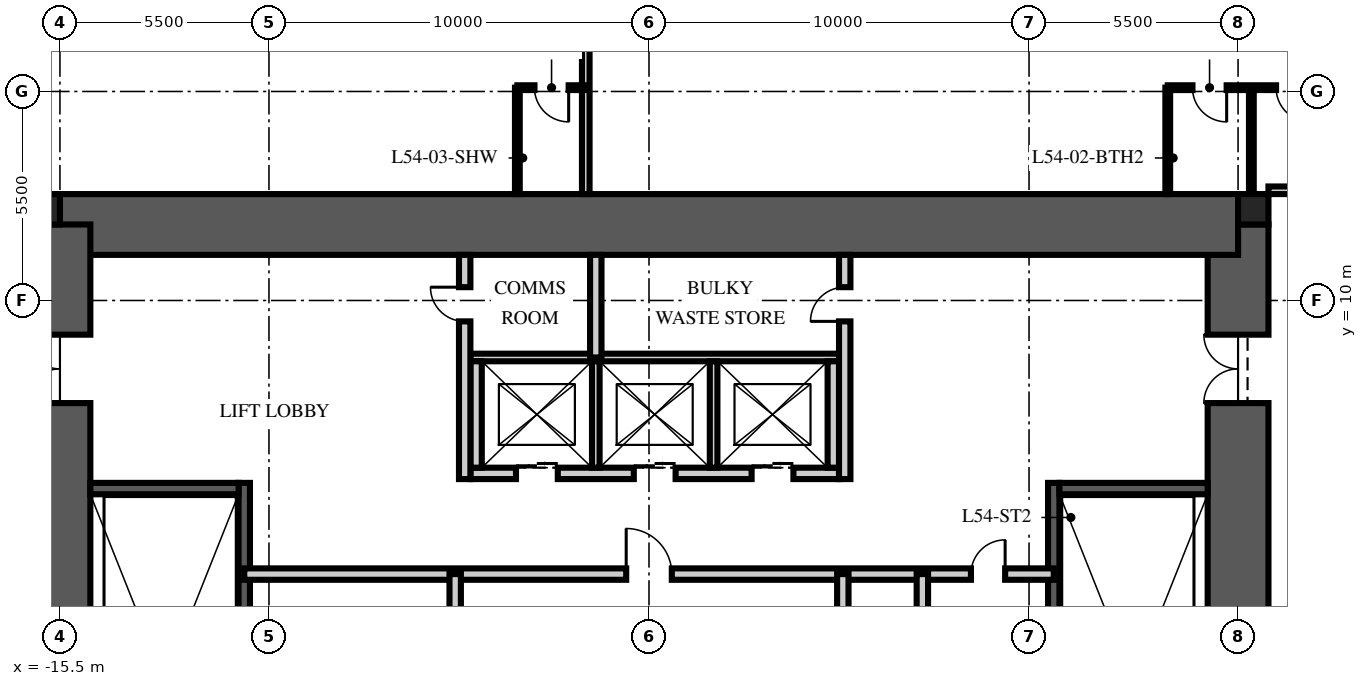
"""IFC4 building model, lengths in metres.
Left out: names, types, materials, properties, quantities, classifications, styles, units other than length and angle.
Written with IfcOpenShell. Run it as: python <this file> out.ifc"""

import sys

from ifc_helpers import new_model, si_unit, direction, frame, frame_2d, origin, origin_2d, place, context, subcontext, project, spatial, rectangle, extrude, element, fill, save


model = new_model("IFC4")
c1 = context("Model", 3, precision=1e-05, world=origin(), true_north=direction((0.0, 1.0)))
c2 = subcontext(c1, "Body", "Model", "MODEL_VIEW")
j1 = project(units=[si_unit("LENGTHUNIT", "METRE"), si_unit("PLANEANGLEUNIT", "RADIAN")], contexts=[c1])
p1 = place(None, origin())
s1 = spatial("IfcSite", under=j1, at=p1, CompositionType="ELEMENT")
p2 = place(p1, origin())
s2 = spatial("IfcBuilding", under=s1, at=p2, CompositionType="ELEMENT")
p3 = place(p2, frame((0.0, 0.0, 218.25)))
s3 = spatial("IfcBuildingStorey", under=s2, at=p3, CompositionType="ELEMENT", Elevation=218.25)
p4 = place(p3, frame((15.5, -12.0, -0.25), z_axis=(0.0, 0.0, 1.0), x_axis=(0.0, 1.0, 0.0)))
e1 = element("IfcWall", 1, at=p4, inside=s3, PredefinedType="SHEAR", context=c2, shape_type="SweptSolid", body=[
    extrude(rectangle(XDim=24.0, YDim=1.6, at=frame_2d((12.0, 0.0))), origin(), (0.0, 0.0, 1.0), 3.75),
])
p5 = place(p4, frame((3.2, 0.0, 0.25)))
e2 = element("IfcOpeningElement", 2, at=p5, cuts=e1, PredefinedType="OPENING", context=c2, shape_type="SweptSolid", body=[
    extrude(rectangle(XDim=1.2, YDim=2.1, at=frame_2d((0.6, 1.05))), frame((0.0, 0.81, 0.0), z_axis=(0.0, -1.0, 0.0), x_axis=(1.0, 0.0, 0.0)), (0.0, 0.0, 1.0), 1.62),
])
p6 = place(p4, frame((19.3, 0.0, 0.25)))
e3 = element("IfcOpeningElement", 3, at=p6, cuts=e1, PredefinedType="OPENING", context=c2, shape_type="SweptSolid", body=[
    extrude(rectangle(XDim=1.8, YDim=2.1, at=frame_2d((0.9, 1.05))), frame((0.0, 0.81, 0.0), z_axis=(0.0, -1.0, 0.0), x_axis=(1.0, 0.0, 0.0)), (0.0, 0.0, 1.0), 1.62),
])
p7 = place(p3, frame((-15.5, 12.0, -0.25), z_axis=(0.0, 0.0, 1.0), x_axis=(1.0, 0.0, 0.0)))
e4 = element("IfcWall", 4, at=p7, inside=s3, PredefinedType="SHEAR", context=c2, shape_type="SweptSolid", body=[
    extrude(rectangle(XDim=31.0, YDim=1.6, at=frame_2d((15.5, 0.0))), origin(), (0.0, 0.0, 1.0), 3.75),
])
p8 = place(p3, frame((-15.5, -12.0, -0.25), z_axis=(0.0, 0.0, 1.0), x_axis=(0.0, 1.0, 0.0)))
e5 = element("IfcWall", 5, at=p8, inside=s3, PredefinedType="SHEAR", context=c2, shape_type="SweptSolid", body=[
    extrude(rectangle(XDim=24.0, YDim=1.6, at=frame_2d((12.0, 0.0))), origin(), (0.0, 0.0, 1.0), 3.75),
])
p9 = place(p8, frame((3.2, 0.0, 0.25)))
e6 = element("IfcOpeningElement", 6, at=p9, cuts=e5, PredefinedType="OPENING", context=c2, shape_type="SweptSolid", body=[
    extrude(rectangle(XDim=1.2, YDim=2.1, at=frame_2d((0.6, 1.05))), frame((0.0, 0.81, 0.0), z_axis=(0.0, -1.0, 0.0), x_axis=(1.0, 0.0, 0.0)), (0.0, 0.0, 1.0), 1.62),
])
p10 = place(p8, frame((19.3, 0.0, 0.25)))
e7 = element("IfcOpeningElement", 7, at=p10, cuts=e5, PredefinedType="OPENING", context=c2, shape_type="SweptSolid", body=[
    extrude(rectangle(XDim=1.8, YDim=2.1, at=frame_2d((0.9, 1.05))), frame((0.0, 0.81, 0.0), z_axis=(0.0, -1.0, 0.0), x_axis=(1.0, 0.0, 0.0)), (0.0, 0.0, 1.0), 1.62),
])
for number, where, z_axis, x_axis in (
    (8, (15.9, 12.4, -0.25), (0.0, 0.0, 1.0), (1.0, 0.0, 0.0)),
    (9, (-15.9, 12.4, -0.25), (0.0, 0.0, 1.0), (1.0, 0.0, 0.0)),
):
    element("IfcColumn", number, at=place(p3, frame(where, z_axis=z_axis, x_axis=x_axis)), inside=s3, PredefinedType="COLUMN", context=c2, shape_type="SweptSolid", body=[
        extrude(rectangle(XDim=0.8, YDim=0.8, at=origin_2d()), origin(), (0.0, 0.0, 1.0), 3.75),
    ])
p11 = place(p3, frame((-10.65, -4.9, 0.0), z_axis=(0.0, 0.0, 1.0), x_axis=(0.0, 1.0, 0.0)))
e10 = element("IfcWall", 10, at=p11, inside=s3, PredefinedType="SOLIDWALL", context=c2, shape_type="SweptSolid", body=[
    extrude(rectangle(XDim=10.1, YDim=0.3, at=frame_2d((5.05, 0.0))), origin(), (0.0, 0.0, 1.0), 3.5),
])
p12 = place(p3, frame((-14.7, 5.05, 0.0), z_axis=(0.0, 0.0, 1.0), x_axis=(1.0, 0.0, 0.0)))
e11 = element("IfcWall", 11, at=p12, inside=s3, PredefinedType="SOLIDWALL", context=c2, shape_type="SweptSolid", body=[
    extrude(rectangle(XDim=3.9, YDim=0.3, at=frame_2d((1.95, 0.0))), origin(), (0.0, 0.0, 1.0), 3.5),
])
p13 = place(p3, frame((10.65, -4.9, 0.0), z_axis=(0.0, 0.0, 1.0), x_axis=(0.0, 1.0, 0.0)))
e12 = element("IfcWall", 12, at=p13, inside=s3, PredefinedType="SOLIDWALL", context=c2, shape_type="SweptSolid", body=[
    extrude(rectangle(XDim=10.1, YDim=0.3, at=frame_2d((5.05, 0.0))), origin(), (0.0, 0.0, 1.0), 3.5),
])
p14 = place(p3, frame((14.7, 5.05, 0.0), z_axis=(0.0, 0.0, 1.0), x_axis=(-1.0, 0.0, 0.0)))
e13 = element("IfcWall", 13, at=p14, inside=s3, PredefinedType="SOLIDWALL", context=c2, shape_type="SweptSolid", body=[
    extrude(rectangle(XDim=3.9, YDim=0.3, at=frame_2d((1.95, 0.0))), origin(), (0.0, 0.0, 1.0), 3.5),
])
p15 = place(p3, frame((-4.7, 5.45, 0.0), z_axis=(0.0, 0.0, 1.0), x_axis=(1.0, 0.0, 0.0)))
e14 = element("IfcWall", 14, at=p15, inside=s3, PredefinedType="PARTITIONING", context=c2, shape_type="SweptSolid", body=[
    extrude(rectangle(XDim=9.7, YDim=0.3, at=frame_2d((4.85, 0.0))), origin(), (0.0, 0.0, 1.0), 3.5),
])
p16 = place(p15, frame((1.2, 0.0, 0.0)))
e15 = element("IfcOpeningElement", 15, at=p16, cuts=e14, PredefinedType="OPENING", context=c2, shape_type="SweptSolid", body=[
    extrude(rectangle(XDim=1.1, YDim=2.1, at=frame_2d((0.55, 1.05))), frame((0.0, 0.16, 0.0), z_axis=(0.0, -1.0, 0.0), x_axis=(1.0, 0.0, 0.0)), (0.0, 0.0, 1.0), 0.32),
])
p17 = place(p15, frame((4.3, 0.0, 0.0)))
e16 = element("IfcOpeningElement", 16, at=p17, cuts=e14, PredefinedType="OPENING", context=c2, shape_type="SweptSolid", body=[
    extrude(rectangle(XDim=1.1, YDim=2.1, at=frame_2d((0.55, 1.05))), frame((0.0, 0.16, 0.0), z_axis=(0.0, -1.0, 0.0), x_axis=(1.0, 0.0, 0.0)), (0.0, 0.0, 1.0), 0.32),
])
p18 = place(p15, frame((7.4, 0.0, 0.0)))
e17 = element("IfcOpeningElement", 17, at=p18, cuts=e14, PredefinedType="OPENING", context=c2, shape_type="SweptSolid", body=[
    extrude(rectangle(XDim=1.1, YDim=2.1, at=frame_2d((0.55, 1.05))), frame((0.0, 0.16, 0.0), z_axis=(0.0, -1.0, 0.0), x_axis=(1.0, 0.0, 0.0)), (0.0, 0.0, 1.0), 0.32),
])
p19 = place(p3, frame((-4.7, 8.5, 0.0), z_axis=(0.0, 0.0, 1.0), x_axis=(1.0, 0.0, 0.0)))
e18 = element("IfcWall", 18, at=p19, inside=s3, PredefinedType="PARTITIONING", context=c2, shape_type="SweptSolid", body=[
    extrude(rectangle(XDim=9.7, YDim=0.2, at=frame_2d((4.85, 0.0))), origin(), (0.0, 0.0, 1.0), 3.5),
])
for number, where, z_axis, x_axis in (
    (19, (-4.55, 5.6, 0.0), (0.0, 0.0, 1.0), (0.0, 1.0, 0.0)),
    (20, (4.85, 5.6, 0.0), (0.0, 0.0, 1.0), (0.0, 1.0, 0.0)),
):
    element("IfcWall", number, at=place(p3, frame(where, z_axis=z_axis, x_axis=x_axis)), inside=s3, PredefinedType="PARTITIONING", context=c2, shape_type="SweptSolid", body=[
        extrude(rectangle(XDim=2.8, YDim=0.3, at=frame_2d((1.4, 0.0))), origin(), (0.0, 0.0, 1.0), 3.5),
    ])
for number, where, z_axis, x_axis in (
    (21, (-1.4, 5.6, 0.0), (0.0, 0.0, 1.0), (0.0, 1.0, 0.0)),
    (22, (1.7, 5.6, 0.0), (0.0, 0.0, 1.0), (0.0, 1.0, 0.0)),
):
    element("IfcWall", number, at=place(p3, frame(where, z_axis=z_axis, x_axis=x_axis)), inside=s3, PredefinedType="PARTITIONING", context=c2, shape_type="SweptSolid", body=[
        extrude(rectangle(XDim=2.8, YDim=0.2, at=frame_2d((1.4, 0.0))), origin(), (0.0, 0.0, 1.0), 3.5),
    ])
p20 = place(p3, frame((-10.65, 2.8, 0.0), z_axis=(0.0, 0.0, 1.0), x_axis=(1.0, 0.0, 0.0)))
e23 = element("IfcWall", 23, at=p20, inside=s3, PredefinedType="PARTITIONING", context=c2, shape_type="SweptSolid", body=[
    extrude(rectangle(XDim=21.3, YDim=0.3, at=frame_2d((10.65, 0.0))), origin(), (0.0, 0.0, 1.0), 3.5),
])
p21 = place(p20, frame((10.05, 0.0, 0.0)))
e24 = element("IfcOpeningElement", 24, at=p21, cuts=e23, PredefinedType="OPENING", context=c2, shape_type="SweptSolid", body=[
    extrude(rectangle(XDim=1.2, YDim=2.1, at=frame_2d((0.6, 1.05))), frame((0.0, 0.16, 0.0), z_axis=(0.0, -1.0, 0.0), x_axis=(1.0, 0.0, 0.0)), (0.0, 0.0, 1.0), 0.32),
])
p22 = place(p20, frame((19.121, 0.0, 0.0)))
e25 = element("IfcOpeningElement", 25, at=p22, cuts=e23, PredefinedType="OPENING", context=c2, shape_type="SweptSolid", body=[
    extrude(rectangle(XDim=0.9, YDim=2.1, at=frame_2d((0.45, 1.05))), frame((0.0, 0.16, 0.0), z_axis=(0.0, -1.0, 0.0), x_axis=(1.0, 0.0, 0.0)), (0.0, 0.0, 1.0), 0.32),
])
p23 = place(p3, frame((-5.1, -6.65, 0.0), z_axis=(0.0, 0.0, 1.0), x_axis=(0.0, 1.0, 0.0)))
e26 = element("IfcWall", 26, at=p23, inside=s3, PredefinedType="PARTITIONING", context=c2, shape_type="SweptSolid", body=[
    extrude(rectangle(XDim=9.45, YDim=0.3, at=frame_2d((4.725, 0.0))), origin(), (0.0, 0.0, 1.0), 3.5),
])
p24 = place(p23, frame((2.648, 0.0, 0.0)))
e27 = element("IfcOpeningElement", 27, at=p24, cuts=e26, PredefinedType="OPENING", context=c2, shape_type="SweptSolid", body=[
    extrude(rectangle(XDim=0.9, YDim=2.1, at=frame_2d((0.45, 1.05))), frame((0.0, 0.16, 0.0), z_axis=(0.0, -1.0, 0.0), x_axis=(1.0, 0.0, 0.0)), (0.0, 0.0, 1.0), 0.32),
])
p25 = place(p23, frame((7.373, 0.0, 0.0)))
e28 = element("IfcOpeningElement", 28, at=p25, cuts=e26, PredefinedType="OPENING", context=c2, shape_type="SweptSolid", body=[
    extrude(rectangle(XDim=0.9, YDim=2.1, at=frame_2d((0.45, 1.05))), frame((0.0, 0.16, 0.0), z_axis=(0.0, -1.0, 0.0), x_axis=(1.0, 0.0, 0.0)), (0.0, 0.0, 1.0), 0.32),
])
p26 = place(p3, frame((5.1, -6.65, 0.0), z_axis=(0.0, 0.0, 1.0), x_axis=(0.0, 1.0, 0.0)))
e29 = element("IfcWall", 29, at=p26, inside=s3, PredefinedType="PARTITIONING", context=c2, shape_type="SweptSolid", body=[
    extrude(rectangle(XDim=9.45, YDim=0.3, at=frame_2d((4.725, 0.0))), origin(), (0.0, 0.0, 1.0), 3.5),
])
p27 = place(p26, frame((4.275, 0.0, 0.0)))
e30 = element("IfcOpeningElement", 30, at=p27, cuts=e29, PredefinedType="OPENING", context=c2, shape_type="SweptSolid", body=[
    extrude(rectangle(XDim=0.9, YDim=2.1, at=frame_2d((0.45, 1.05))), frame((0.0, 0.16, 0.0), z_axis=(0.0, -1.0, 0.0), x_axis=(1.0, 0.0, 0.0)), (0.0, 0.0, 1.0), 0.32),
])
p28 = place(p3, frame((7.193, -6.65, 0.0), z_axis=(0.0, 0.0, 1.0), x_axis=(0.0, 1.0, 0.0)))
e31 = element("IfcWall", 31, at=p28, inside=s3, PredefinedType="PARTITIONING", context=c2, shape_type="SweptSolid", body=[
    extrude(rectangle(XDim=9.45, YDim=0.3, at=frame_2d((4.725, 0.0))), origin(), (0.0, 0.0, 1.0), 3.5),
])
p29 = place(p3, frame((-4.85, 5.3, 0.0), z_axis=(0.0, 0.0, 1.0), x_axis=(0.0, 1.0, 0.0)))
e32 = element("IfcWall", 32, at=p29, inside=s3, PredefinedType="PARTITIONING", context=c2, shape_type="SweptSolid", body=[
    extrude(rectangle(XDim=5.9, YDim=0.3, at=frame_2d((2.95, 0.0))), origin(), (0.0, 0.0, 1.0), 3.5),
])
p30 = place(p29, frame((4.15, 0.0, 0.0)))
e33 = element("IfcOpeningElement", 33, at=p30, cuts=e32, PredefinedType="OPENING", context=c2, shape_type="SweptSolid", body=[
    extrude(rectangle(XDim=0.9, YDim=2.1, at=frame_2d((0.45, 1.05))), frame((0.0, 0.16, 0.0), z_axis=(0.0, -1.0, 0.0), x_axis=(1.0, 0.0, 0.0)), (0.0, 0.0, 1.0), 0.32),
])
p31 = place(p3, frame((5.15, 5.3, 0.0), z_axis=(0.0, 0.0, 1.0), x_axis=(0.0, 1.0, 0.0)))
e34 = element("IfcWall", 34, at=p31, inside=s3, PredefinedType="PARTITIONING", context=c2, shape_type="SweptSolid", body=[
    extrude(rectangle(XDim=5.9, YDim=0.3, at=frame_2d((2.95, 0.0))), origin(), (0.0, 0.0, 1.0), 3.5),
])
p32 = place(p31, frame((4.15, 0.0, 0.0)))
e35 = element("IfcOpeningElement", 35, at=p32, cuts=e34, PredefinedType="OPENING", context=c2, shape_type="SweptSolid", body=[
    extrude(rectangle(XDim=0.9, YDim=2.1, at=frame_2d((0.45, 1.05))), frame((0.0, 0.16, 0.0), z_axis=(0.0, -1.0, 0.0), x_axis=(1.0, 0.0, 0.0)), (0.0, 0.0, 1.0), 0.32),
])
p33 = place(p3, frame((-1.4, 8.5, 0.0), z_axis=(0.0, 0.0, 1.0), x_axis=(0.0, 1.0, 0.0)))
e36 = element("IfcWall", 36, at=p33, inside=s3, PredefinedType="PARTITIONING", context=c2, shape_type="SweptSolid", body=[
    extrude(rectangle(XDim=2.7, YDim=0.3, at=frame_2d((1.35, 0.0))), origin(), (0.0, 0.0, 1.0), 3.5),
])
p34 = place(p3, frame((16.3, 12.9, 0.0), z_axis=(0.0, 0.0, 1.0), x_axis=(1.0, 0.0, 0.0)))
e37 = element("IfcWall", 37, at=p34, inside=s3, PredefinedType="PARTITIONING", context=c2, shape_type="SweptSolid", body=[
    extrude(rectangle(XDim=1.6, YDim=0.2, at=frame_2d((0.8, 0.0))), origin(), (0.0, 0.0, 1.0), 2.3),
])
p35 = place(p3, frame((-1.664, 12.8, 0.0), z_axis=(0.0, 0.0, 1.0), x_axis=(0.0, 1.0, 0.0)))
e38 = element("IfcWall", 38, at=p35, inside=s3, PredefinedType="PARTITIONING", context=c2, shape_type="SweptSolid", body=[
    extrude(rectangle(XDim=13.4, YDim=0.2, at=frame_2d((6.7, 0.0))), origin(), (0.0, 0.0, 1.0), 2.91),
])
p36 = place(p3, frame((18.05, 15.6, 0.0), z_axis=(0.0, 0.0, 1.0), x_axis=(-1.0, 0.0, 0.0)))
e39 = element("IfcWall", 39, at=p36, inside=s3, PredefinedType="PARTITIONING", context=c2, shape_type="SweptSolid", body=[
    extrude(rectangle(XDim=4.4, YDim=0.125, at=frame_2d((2.2, 0.0))), origin(), (0.0, 0.0, 1.0), 2.3),
])
p37 = place(p36, frame((0.65, 0.0, 0.0)))
e40 = element("IfcOpeningElement", 40, at=p37, cuts=e39, PredefinedType="OPENING", context=c2, shape_type="SweptSolid", body=[
    extrude(rectangle(XDim=0.9, YDim=2.1, at=frame_2d((0.45, 1.05))), frame((0.0, 0.073, 0.0), z_axis=(0.0, -1.0, 0.0), x_axis=(1.0, 0.0, 0.0)), (0.0, 0.0, 1.0), 0.145),
])
p38 = place(p36, frame((2.85, 0.0, 0.0)))
e41 = element("IfcOpeningElement", 41, at=p38, cuts=e39, PredefinedType="OPENING", context=c2, shape_type="SweptSolid", body=[
    extrude(rectangle(XDim=0.9, YDim=2.1, at=frame_2d((0.45, 1.05))), frame((0.0, 0.073, 0.0), z_axis=(0.0, -1.0, 0.0), x_axis=(1.0, 0.0, 0.0)), (0.0, 0.0, 1.0), 0.145),
])
p39 = place(p3, frame((15.85, 12.8, 0.0), z_axis=(0.0, 0.0, 1.0), x_axis=(0.0, 1.0, 0.0)))
e42 = element("IfcWall", 42, at=p39, inside=s3, PredefinedType="PARTITIONING", context=c2, shape_type="SweptSolid", body=[
    extrude(rectangle(XDim=2.8, YDim=0.125, at=frame_2d((1.4, 0.0))), origin(), (0.0, 0.0, 1.0), 2.3),
])
p40 = place(p3, frame((13.65, 12.8, 0.0), z_axis=(0.0, 0.0, 1.0), x_axis=(0.0, 1.0, 0.0)))
e43 = element("IfcWall", 43, at=p40, inside=s3, PredefinedType="PARTITIONING", context=c2, shape_type="SweptSolid", body=[
    extrude(rectangle(XDim=2.8, YDim=0.125, at=frame_2d((1.4, 0.0))), origin(), (0.0, 0.0, 1.0), 3.5),
])
p41 = place(p3, frame((-1.664, 15.6, 0.0), z_axis=(0.0, 0.0, 1.0), x_axis=(-1.0, 0.0, 0.0)))
e44 = element("IfcWall", 44, at=p41, inside=s3, PredefinedType="PARTITIONING", context=c2, shape_type="SweptSolid", body=[
    extrude(rectangle(XDim=1.8, YDim=0.125, at=frame_2d((0.9, 0.0))), origin(), (0.0, 0.0, 1.0), 3.5),
])
p42 = place(p41, frame((0.45, 0.0, 0.0)))
e45 = element("IfcOpeningElement", 45, at=p42, cuts=e44, PredefinedType="OPENING", context=c2, shape_type="SweptSolid", body=[
    extrude(rectangle(XDim=0.9, YDim=2.1, at=frame_2d((0.45, 1.05))), frame((0.0, 0.073, 0.0), z_axis=(0.0, -1.0, 0.0), x_axis=(1.0, 0.0, 0.0)), (0.0, 0.0, 1.0), 0.145),
])
p43 = place(p3, frame((-3.464, 12.8, 0.0), z_axis=(0.0, 0.0, 1.0), x_axis=(0.0, 1.0, 0.0)))
e46 = element("IfcWall", 46, at=p43, inside=s3, PredefinedType="PARTITIONING", context=c2, shape_type="SweptSolid", body=[
    extrude(rectangle(XDim=2.8, YDim=0.125, at=frame_2d((1.4, 0.0))), origin(), (0.0, 0.0, 1.0), 3.5),
])
p44 = place(p10, origin())
e47 = element("IfcDoor", 47, at=p44, inside=s3, OperationType="DOUBLE_DOOR_SINGLE_SWING", PredefinedType="DOOR", context=c2, shape_type="SweptSolid", body=[
    extrude(rectangle(XDim=1.8, YDim=2.1, at=frame_2d((0.9, 1.05))), frame((0.0, 0.025, 0.0), z_axis=(0.0, -1.0, 0.0), x_axis=(1.0, 0.0, 0.0)), (0.0, 0.0, 1.0), 0.05),
])
fill(e7, e47)
p45 = place(p6, origin())
e48 = element("IfcDoor", 48, at=p45, inside=s3, OperationType="DOUBLE_DOOR_SINGLE_SWING", PredefinedType="DOOR", context=c2, shape_type="SweptSolid", body=[
    extrude(rectangle(XDim=1.8, YDim=2.1, at=frame_2d((0.9, 1.05))), frame((0.0, 0.025, 0.0), z_axis=(0.0, -1.0, 0.0), x_axis=(1.0, 0.0, 0.0)), (0.0, 0.0, 1.0), 0.05),
])
fill(e3, e48)
p46 = place(p16, origin())
e49 = element("IfcDoor", 49, at=p46, inside=s3, OperationType="DOUBLE_DOOR_SLIDING", PredefinedType="DOOR", context=c2, shape_type="SweptSolid", body=[
    extrude(rectangle(XDim=1.1, YDim=2.1, at=frame_2d((0.55, 1.05))), frame((0.0, 0.025, 0.0), z_axis=(0.0, -1.0, 0.0), x_axis=(1.0, 0.0, 0.0)), (0.0, 0.0, 1.0), 0.05),
])
fill(e15, e49)
p47 = place(p17, origin())
e50 = element("IfcDoor", 50, at=p47, inside=s3, OperationType="DOUBLE_DOOR_SLIDING", PredefinedType="DOOR", context=c2, shape_type="SweptSolid", body=[
    extrude(rectangle(XDim=1.1, YDim=2.1, at=frame_2d((0.55, 1.05))), frame((0.0, 0.025, 0.0), z_axis=(0.0, -1.0, 0.0), x_axis=(1.0, 0.0, 0.0)), (0.0, 0.0, 1.0), 0.05),
])
fill(e16, e50)
p48 = place(p18, origin())
e51 = element("IfcDoor", 51, at=p48, inside=s3, OperationType="DOUBLE_DOOR_SLIDING", PredefinedType="DOOR", context=c2, shape_type="SweptSolid", body=[
    extrude(rectangle(XDim=1.1, YDim=2.1, at=frame_2d((0.55, 1.05))), frame((0.0, 0.025, 0.0), z_axis=(0.0, -1.0, 0.0), x_axis=(1.0, 0.0, 0.0)), (0.0, 0.0, 1.0), 0.05),
])
fill(e17, e51)
p49 = place(p21, origin())
e52 = element("IfcDoor", 52, at=p49, inside=s3, OperationType="SINGLE_SWING_LEFT", PredefinedType="DOOR", context=c2, shape_type="SweptSolid", body=[
    extrude(rectangle(XDim=1.2, YDim=2.1, at=frame_2d((0.6, 1.05))), frame((0.0, 0.025, 0.0), z_axis=(0.0, -1.0, 0.0), x_axis=(1.0, 0.0, 0.0)), (0.0, 0.0, 1.0), 0.05),
])
fill(e24, e52)
p50 = place(p22, origin())
e53 = element("IfcDoor", 53, at=p50, inside=s3, OperationType="SINGLE_SWING_RIGHT", PredefinedType="DOOR", context=c2, shape_type="SweptSolid", body=[
    extrude(rectangle(XDim=0.9, YDim=2.1, at=frame_2d((0.45, 1.05))), frame((0.0, 0.025, 0.0), z_axis=(0.0, -1.0, 0.0), x_axis=(1.0, 0.0, 0.0)), (0.0, 0.0, 1.0), 0.05),
])
fill(e25, e53)
p51 = place(p30, origin())
e54 = element("IfcDoor", 54, at=p51, inside=s3, OperationType="SINGLE_SWING_RIGHT", PredefinedType="DOOR", context=c2, shape_type="SweptSolid", body=[
    extrude(rectangle(XDim=0.9, YDim=2.1, at=frame_2d((0.45, 1.05))), frame((0.0, 0.025, 0.0), z_axis=(0.0, -1.0, 0.0), x_axis=(1.0, 0.0, 0.0)), (0.0, 0.0, 1.0), 0.05),
])
fill(e33, e54)
p52 = place(p32, origin())
e55 = element("IfcDoor", 55, at=p52, inside=s3, OperationType="SINGLE_SWING_LEFT", PredefinedType="DOOR", context=c2, shape_type="SweptSolid", body=[
    extrude(rectangle(XDim=0.9, YDim=2.1, at=frame_2d((0.45, 1.05))), frame((0.0, 0.025, 0.0), z_axis=(0.0, -1.0, 0.0), x_axis=(1.0, 0.0, 0.0)), (0.0, 0.0, 1.0), 0.05),
])
fill(e35, e55)
p53 = place(p37, origin())
e56 = element("IfcDoor", 56, at=p53, inside=s3, OperationType="SINGLE_SWING_LEFT", PredefinedType="DOOR", context=c2, shape_type="SweptSolid", body=[
    extrude(rectangle(XDim=0.9, YDim=2.1, at=frame_2d((0.45, 1.05))), frame((0.0, 0.025, 0.0), z_axis=(0.0, -1.0, 0.0), x_axis=(1.0, 0.0, 0.0)), (0.0, 0.0, 1.0), 0.05),
])
fill(e40, e56)
p54 = place(p38, origin())
e57 = element("IfcDoor", 57, at=p54, inside=s3, OperationType="SINGLE_SWING_LEFT", PredefinedType="DOOR", context=c2, shape_type="SweptSolid", body=[
    extrude(rectangle(XDim=0.9, YDim=2.1, at=frame_2d((0.45, 1.05))), frame((0.0, 0.025, 0.0), z_axis=(0.0, -1.0, 0.0), x_axis=(1.0, 0.0, 0.0)), (0.0, 0.0, 1.0), 0.05),
])
fill(e41, e57)
p55 = place(p42, origin())
e58 = element("IfcDoor", 58, at=p55, inside=s3, OperationType="SINGLE_SWING_LEFT", PredefinedType="DOOR", context=c2, shape_type="SweptSolid", body=[
    extrude(rectangle(XDim=0.9, YDim=2.1, at=frame_2d((0.45, 1.05))), frame((0.0, 0.025, 0.0), z_axis=(0.0, -1.0, 0.0), x_axis=(1.0, 0.0, 0.0)), (0.0, 0.0, 1.0), 0.05),
])
fill(e45, e58)
save(model, sys.argv[1])
